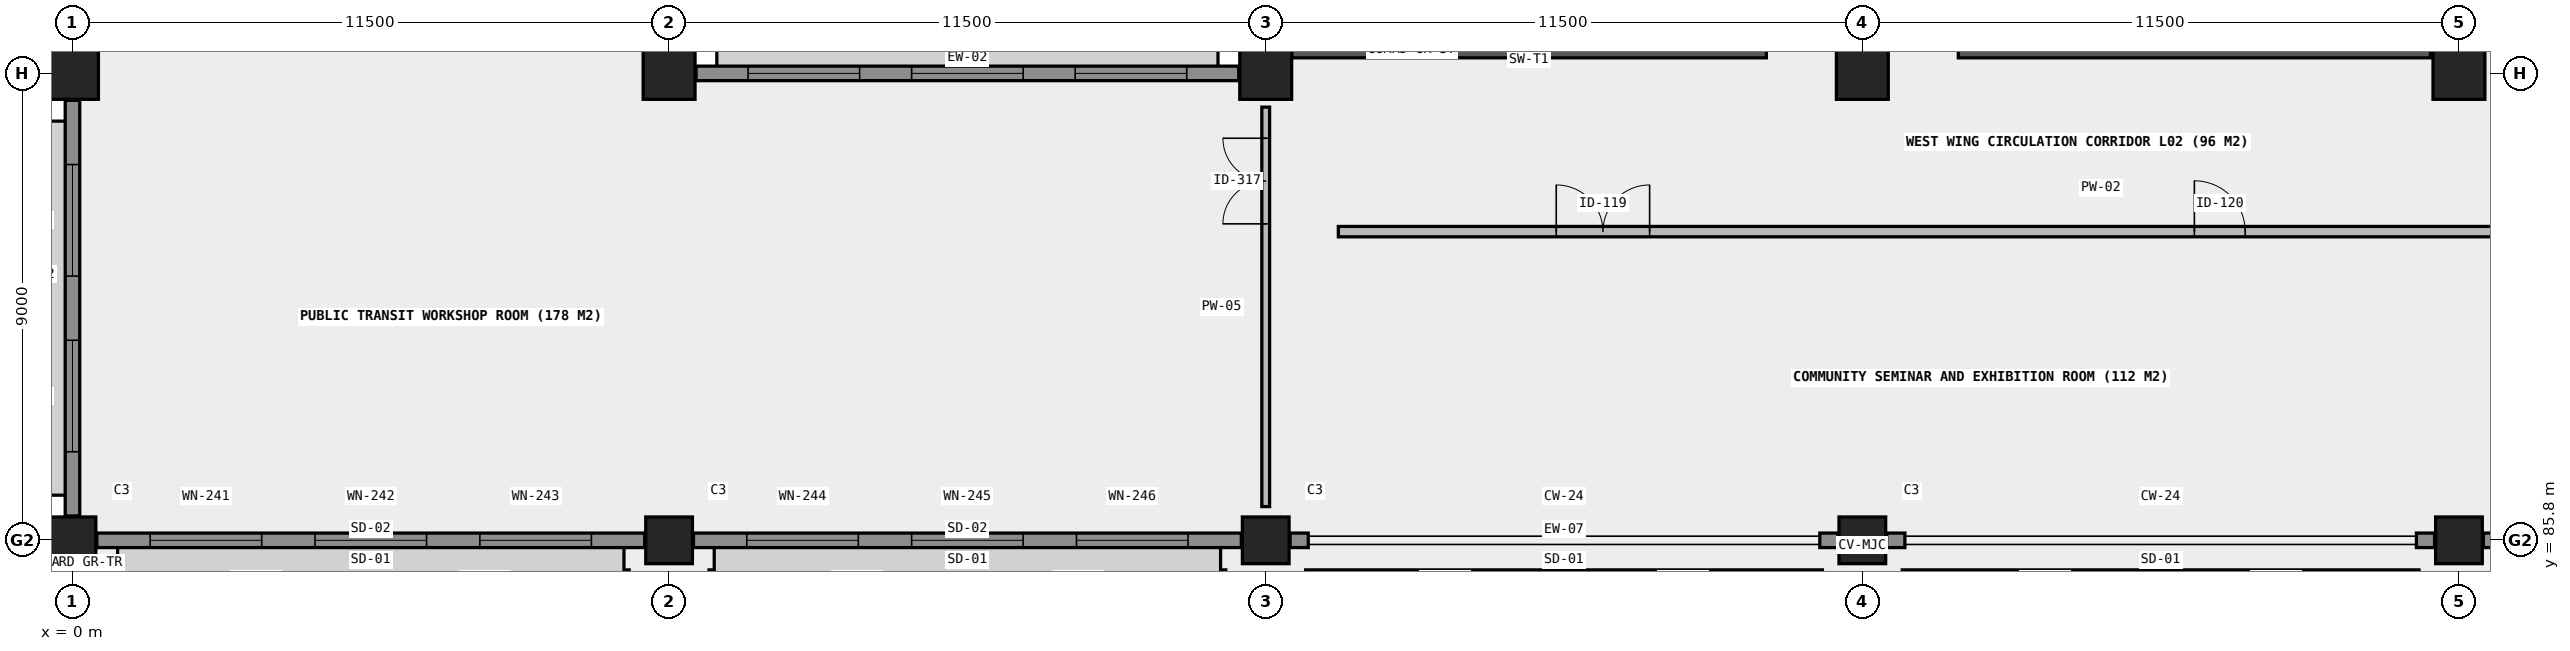
"""IFC4 building model, lengths in metres.
Left out: names, types, materials, properties, quantities, classifications, styles, units other than length and angle.
Written with IfcOpenShell. Run it as: python <this file> out.ifc"""

import sys

from ifc_helpers import new_model, si_unit, direction, frame, frame_2d, origin, origin_2d, place, context, subcontext, project, spatial, rectangle, extrude, element, fill, save


model = new_model("IFC4")
c1 = context("Model", 3, precision=1e-05, world=origin(), true_north=direction((0.0, 1.0)))
c2 = subcontext(c1, "Body", "Model", "MODEL_VIEW")
j1 = project(units=[si_unit("LENGTHUNIT", "METRE"), si_unit("PLANEANGLEUNIT", "RADIAN")], contexts=[c1])
p1 = place(None, origin())
s1 = spatial("IfcSite", under=j1, at=p1, CompositionType="ELEMENT")
p2 = place(p1, origin())
s2 = spatial("IfcBuilding", under=s1, at=p2, CompositionType="ELEMENT")
p3 = place(p2, frame((0.0, 0.0, 8.4)))
s3 = spatial("IfcBuildingStorey", under=s2, at=p3, CompositionType="ELEMENT", Elevation=8.4)
p4 = place(p3, frame((0.0, 85.8, 0.0), z_axis=(0.0, 0.0, 1.0), x_axis=(1.0, 0.0, 0.0)))
e1 = element("IfcColumn", 1, at=p4, inside=s3, PredefinedType="COLUMN", context=c2, shape_type="SweptSolid", body=[
    extrude(rectangle(XDim=0.9, YDim=0.9, at=origin_2d()), origin(), (0.0, 0.0, 1.0), 5.4),
])
p5 = place(p3, frame((0.0, 94.8, 0.0), z_axis=(0.0, 0.0, 1.0), x_axis=(1.0, 0.0, 0.0)))
e2 = element("IfcColumn", 2, at=p5, inside=s3, PredefinedType="COLUMN", context=c2, shape_type="SweptSolid", body=[
    extrude(rectangle(XDim=1.0, YDim=1.0, at=origin_2d()), origin(), (0.0, 0.0, 1.0), 5.4),
])
p6 = place(p3, frame((11.5, 85.8, 0.0), z_axis=(0.0, 0.0, 1.0), x_axis=(1.0, 0.0, 0.0)))
e3 = element("IfcColumn", 3, at=p6, inside=s3, PredefinedType="COLUMN", context=c2, shape_type="SweptSolid", body=[
    extrude(rectangle(XDim=0.9, YDim=0.9, at=origin_2d()), origin(), (0.0, 0.0, 1.0), 5.4),
])
p7 = place(p3, frame((11.5, 94.8, 0.0), z_axis=(0.0, 0.0, 1.0), x_axis=(1.0, 0.0, 0.0)))
e4 = element("IfcColumn", 4, at=p7, inside=s3, PredefinedType="COLUMN", context=c2, shape_type="SweptSolid", body=[
    extrude(rectangle(XDim=1.0, YDim=1.0, at=origin_2d()), origin(), (0.0, 0.0, 1.0), 5.4),
])
p8 = place(p3, frame((23.0, 85.8, 0.0), z_axis=(0.0, 0.0, 1.0), x_axis=(1.0, 0.0, 0.0)))
e5 = element("IfcColumn", 5, at=p8, inside=s3, PredefinedType="COLUMN", context=c2, shape_type="SweptSolid", body=[
    extrude(rectangle(XDim=0.9, YDim=0.9, at=origin_2d()), origin(), (0.0, 0.0, 1.0), 5.4),
])
p9 = place(p3, frame((23.0, 94.8, 0.0), z_axis=(0.0, 0.0, 1.0), x_axis=(1.0, 0.0, 0.0)))
e6 = element("IfcColumn", 6, at=p9, inside=s3, PredefinedType="COLUMN", context=c2, shape_type="SweptSolid", body=[
    extrude(rectangle(XDim=1.0, YDim=1.0, at=origin_2d()), origin(), (0.0, 0.0, 1.0), 5.4),
])
p10 = place(p3, frame((34.5, 85.8, 0.0), z_axis=(0.0, 0.0, 1.0), x_axis=(1.0, 0.0, 0.0)))
e7 = element("IfcColumn", 7, at=p10, inside=s3, PredefinedType="COLUMN", context=c2, shape_type="SweptSolid", body=[
    extrude(rectangle(XDim=0.9, YDim=0.9, at=origin_2d()), origin(), (0.0, 0.0, 1.0), 5.4),
])
p11 = place(p3, frame((34.5, 94.8, 0.0), z_axis=(0.0, 0.0, 1.0), x_axis=(1.0, 0.0, 0.0)))
e8 = element("IfcColumn", 8, at=p11, inside=s3, PredefinedType="COLUMN", context=c2, shape_type="SweptSolid", body=[
    extrude(rectangle(XDim=1.0, YDim=1.0, at=origin_2d()), origin(), (0.0, 0.0, 1.0), 5.4),
])
p12 = place(p3, frame((46.0, 85.8, 0.0), z_axis=(0.0, 0.0, 1.0), x_axis=(1.0, 0.0, 0.0)))
e9 = element("IfcColumn", 9, at=p12, inside=s3, PredefinedType="COLUMN", context=c2, shape_type="SweptSolid", body=[
    extrude(rectangle(XDim=0.9, YDim=0.9, at=origin_2d()), origin(), (0.0, 0.0, 1.0), 5.4),
])
p13 = place(p3, frame((46.0, 94.8, 0.0), z_axis=(0.0, 0.0, 1.0), x_axis=(1.0, 0.0, 0.0)))
e10 = element("IfcColumn", 10, at=p13, inside=s3, PredefinedType="COLUMN", context=c2, shape_type="SweptSolid", body=[
    extrude(rectangle(XDim=1.0, YDim=1.0, at=origin_2d()), origin(), (0.0, 0.0, 1.0), 5.4),
])
p14 = place(p3, frame((23.5, 95.325, 0.0), z_axis=(0.0, 0.0, 1.0), x_axis=(1.0, 0.0, 0.0)))
e11 = element("IfcWall", 11, at=p14, inside=s3, PredefinedType="SHEAR", context=c2, shape_type="SweptSolid", body=[
    extrude(rectangle(XDim=9.15, YDim=0.45, at=frame_2d((4.575, 0.0))), origin(), (0.0, 0.0, 1.0), 5.4),
])
p15 = place(p3, frame((36.35, 95.325, 0.0), z_axis=(0.0, 0.0, 1.0), x_axis=(1.0, 0.0, 0.0)))
e12 = element("IfcWall", 12, at=p15, inside=s3, PredefinedType="SHEAR", context=c2, shape_type="SweptSolid", body=[
    extrude(rectangle(XDim=9.1, YDim=0.45, at=frame_2d((4.55, 0.0))), origin(), (0.0, 0.0, 1.0), 5.4),
])
p16 = place(p3, frame((0.47, 85.8, 0.0), z_axis=(0.0, 0.0, 1.0), x_axis=(1.0, 0.0, 0.0)))
e13 = element("IfcWall", 13, at=p16, inside=s3, PredefinedType="SOLIDWALL", context=c2, shape_type="SweptSolid", body=[
    extrude(rectangle(XDim=10.56, YDim=0.28, at=frame_2d((5.28, 0.0))), origin(), (0.0, 0.0, 1.0), 4.35),
])
p17 = place(p16, frame((1.028, 0.0, 0.85)))
e14 = element("IfcOpeningElement", 14, at=p17, cuts=e13, PredefinedType="OPENING", context=c2, shape_type="SweptSolid", body=[
    extrude(rectangle(XDim=2.15, YDim=1.95, at=frame_2d((1.075, 0.975))), frame((0.0, 0.15, 0.0), z_axis=(0.0, -1.0, 0.0), x_axis=(1.0, 0.0, 0.0)), (0.0, 0.0, 1.0), 0.3),
])
p18 = place(p16, frame((4.205, 0.0, 0.85)))
e15 = element("IfcOpeningElement", 15, at=p18, cuts=e13, PredefinedType="OPENING", context=c2, shape_type="SweptSolid", body=[
    extrude(rectangle(XDim=2.15, YDim=1.95, at=frame_2d((1.075, 0.975))), frame((0.0, 0.15, 0.0), z_axis=(0.0, -1.0, 0.0), x_axis=(1.0, 0.0, 0.0)), (0.0, 0.0, 1.0), 0.3),
])
p19 = place(p16, frame((7.383, 0.0, 0.85)))
e16 = element("IfcOpeningElement", 16, at=p19, cuts=e13, PredefinedType="OPENING", context=c2, shape_type="SweptSolid", body=[
    extrude(rectangle(XDim=2.15, YDim=1.95, at=frame_2d((1.075, 0.975))), frame((0.0, 0.15, 0.0), z_axis=(0.0, -1.0, 0.0), x_axis=(1.0, 0.0, 0.0)), (0.0, 0.0, 1.0), 0.3),
])
p20 = place(p3, frame((11.97, 85.8, 0.0), z_axis=(0.0, 0.0, 1.0), x_axis=(1.0, 0.0, 0.0)))
e17 = element("IfcWall", 17, at=p20, inside=s3, PredefinedType="SOLIDWALL", context=c2, shape_type="SweptSolid", body=[
    extrude(rectangle(XDim=10.56, YDim=0.28, at=frame_2d((5.28, 0.0))), origin(), (0.0, 0.0, 1.0), 4.35),
])
p21 = place(p20, frame((1.028, 0.0, 0.85)))
e18 = element("IfcOpeningElement", 18, at=p21, cuts=e17, PredefinedType="OPENING", context=c2, shape_type="SweptSolid", body=[
    extrude(rectangle(XDim=2.15, YDim=1.95, at=frame_2d((1.075, 0.975))), frame((0.0, 0.15, 0.0), z_axis=(0.0, -1.0, 0.0), x_axis=(1.0, 0.0, 0.0)), (0.0, 0.0, 1.0), 0.3),
])
p22 = place(p20, frame((4.205, 0.0, 0.85)))
e19 = element("IfcOpeningElement", 19, at=p22, cuts=e17, PredefinedType="OPENING", context=c2, shape_type="SweptSolid", body=[
    extrude(rectangle(XDim=2.15, YDim=1.95, at=frame_2d((1.075, 0.975))), frame((0.0, 0.15, 0.0), z_axis=(0.0, -1.0, 0.0), x_axis=(1.0, 0.0, 0.0)), (0.0, 0.0, 1.0), 0.3),
])
p23 = place(p20, frame((7.383, 0.0, 0.85)))
e20 = element("IfcOpeningElement", 20, at=p23, cuts=e17, PredefinedType="OPENING", context=c2, shape_type="SweptSolid", body=[
    extrude(rectangle(XDim=2.15, YDim=1.95, at=frame_2d((1.075, 0.975))), frame((0.0, 0.15, 0.0), z_axis=(0.0, -1.0, 0.0), x_axis=(1.0, 0.0, 0.0)), (0.0, 0.0, 1.0), 0.3),
])
for number, where, z_axis, x_axis in (
    (21, (23.47, 85.8, 0.0), (0.0, 0.0, 1.0), (1.0, 0.0, 0.0)),
    (22, (33.68, 85.8, 0.0), (0.0, 0.0, 1.0), (1.0, 0.0, 0.0)),
    (23, (34.97, 85.8, 0.0), (0.0, 0.0, 1.0), (1.0, 0.0, 0.0)),
    (24, (45.18, 85.8, 0.0), (0.0, 0.0, 1.0), (1.0, 0.0, 0.0)),
):
    element("IfcWall", number, at=place(p3, frame(where, z_axis=z_axis, x_axis=x_axis)), inside=s3, PredefinedType="SOLIDWALL", context=c2, shape_type="SweptSolid", body=[
        extrude(rectangle(XDim=0.35, YDim=0.28, at=frame_2d((0.175, 0.0))), origin(), (0.0, 0.0, 1.0), 5.13),
    ])
p24 = place(p3, frame((46.47, 85.8, 0.0), z_axis=(0.0, 0.0, 1.0), x_axis=(1.0, 0.0, 0.0)))
e25 = element("IfcWall", 25, at=p24, inside=s3, PredefinedType="SOLIDWALL", context=c2, shape_type="SweptSolid", body=[
    extrude(rectangle(XDim=10.56, YDim=0.28, at=frame_2d((5.28, 0.0))), origin(), (0.0, 0.0, 1.0), 4.35),
])
p25 = place(p24, frame((1.028, 0.0, 0.85)))
e26 = element("IfcOpeningElement", 26, at=p25, cuts=e25, PredefinedType="OPENING", context=c2, shape_type="SweptSolid", body=[
    extrude(rectangle(XDim=2.15, YDim=1.95, at=frame_2d((1.075, 0.975))), frame((0.0, 0.15, 0.0), z_axis=(0.0, -1.0, 0.0), x_axis=(1.0, 0.0, 0.0)), (0.0, 0.0, 1.0), 0.3),
])
p26 = place(p24, frame((4.205, 0.0, 0.85)))
e27 = element("IfcOpeningElement", 27, at=p26, cuts=e25, PredefinedType="OPENING", context=c2, shape_type="SweptSolid", body=[
    extrude(rectangle(XDim=2.15, YDim=1.95, at=frame_2d((1.075, 0.975))), frame((0.0, 0.15, 0.0), z_axis=(0.0, -1.0, 0.0), x_axis=(1.0, 0.0, 0.0)), (0.0, 0.0, 1.0), 0.3),
])
p27 = place(p24, frame((7.383, 0.0, 0.85)))
e28 = element("IfcOpeningElement", 28, at=p27, cuts=e25, PredefinedType="OPENING", context=c2, shape_type="SweptSolid", body=[
    extrude(rectangle(XDim=2.15, YDim=1.95, at=frame_2d((1.075, 0.975))), frame((0.0, 0.15, 0.0), z_axis=(0.0, -1.0, 0.0), x_axis=(1.0, 0.0, 0.0)), (0.0, 0.0, 1.0), 0.3),
])
p28 = place(p3, frame((12.02, 94.8, 0.0), z_axis=(0.0, 0.0, 1.0), x_axis=(1.0, 0.0, 0.0)))
e29 = element("IfcWall", 29, at=p28, inside=s3, PredefinedType="SOLIDWALL", context=c2, shape_type="SweptSolid", body=[
    extrude(rectangle(XDim=10.46, YDim=0.28, at=frame_2d((5.23, 0.0))), origin(), (0.0, 0.0, 1.0), 4.35),
])
p29 = place(p28, frame((1.002, 0.0, 0.85)))
e30 = element("IfcOpeningElement", 30, at=p29, cuts=e29, PredefinedType="OPENING", context=c2, shape_type="SweptSolid", body=[
    extrude(rectangle(XDim=2.15, YDim=1.95, at=frame_2d((1.075, 0.975))), frame((0.0, 0.15, 0.0), z_axis=(0.0, -1.0, 0.0), x_axis=(1.0, 0.0, 0.0)), (0.0, 0.0, 1.0), 0.3),
])
p30 = place(p28, frame((4.155, 0.0, 0.85)))
e31 = element("IfcOpeningElement", 31, at=p30, cuts=e29, PredefinedType="OPENING", context=c2, shape_type="SweptSolid", body=[
    extrude(rectangle(XDim=2.15, YDim=1.95, at=frame_2d((1.075, 0.975))), frame((0.0, 0.15, 0.0), z_axis=(0.0, -1.0, 0.0), x_axis=(1.0, 0.0, 0.0)), (0.0, 0.0, 1.0), 0.3),
])
p31 = place(p28, frame((7.308, 0.0, 0.85)))
e32 = element("IfcOpeningElement", 32, at=p31, cuts=e29, PredefinedType="OPENING", context=c2, shape_type="SweptSolid", body=[
    extrude(rectangle(XDim=2.15, YDim=1.95, at=frame_2d((1.075, 0.975))), frame((0.0, 0.15, 0.0), z_axis=(0.0, -1.0, 0.0), x_axis=(1.0, 0.0, 0.0)), (0.0, 0.0, 1.0), 0.3),
])
p32 = place(p3, frame((0.0, 86.27, 0.0), z_axis=(0.0, 0.0, 1.0), x_axis=(0.0, 1.0, 0.0)))
e33 = element("IfcWall", 33, at=p32, inside=s3, PredefinedType="SOLIDWALL", context=c2, shape_type="SweptSolid", body=[
    extrude(rectangle(XDim=8.01, YDim=0.28, at=frame_2d((4.005, 0.0))), origin(), (0.0, 0.0, 1.0), 4.45),
])
p33 = place(p32, frame((1.237, 0.0, 0.85)))
e34 = element("IfcOpeningElement", 34, at=p33, cuts=e33, PredefinedType="OPENING", context=c2, shape_type="SweptSolid", body=[
    extrude(rectangle(XDim=2.15, YDim=1.95, at=frame_2d((1.075, 0.975))), frame((0.0, 0.15, 0.0), z_axis=(0.0, -1.0, 0.0), x_axis=(1.0, 0.0, 0.0)), (0.0, 0.0, 1.0), 0.3),
])
p34 = place(p32, frame((4.623, 0.0, 0.85)))
e35 = element("IfcOpeningElement", 35, at=p34, cuts=e33, PredefinedType="OPENING", context=c2, shape_type="SweptSolid", body=[
    extrude(rectangle(XDim=2.15, YDim=1.95, at=frame_2d((1.075, 0.975))), frame((0.0, 0.15, 0.0), z_axis=(0.0, -1.0, 0.0), x_axis=(1.0, 0.0, 0.0)), (0.0, 0.0, 1.0), 0.3),
])
p35 = place(p3, frame((24.4, 91.75, 0.0), z_axis=(0.0, 0.0, 1.0), x_axis=(1.0, 0.0, 0.0)))
e36 = element("IfcWall", 36, at=p35, inside=s3, PredefinedType="PARTITIONING", context=c2, shape_type="SweptSolid", body=[
    extrude(rectangle(XDim=29.4, YDim=0.2, at=frame_2d((14.7, 0.0))), origin(), (0.0, 0.0, 1.0), 5.12),
])
p36 = place(p35, frame((4.2, 0.0, 0.0)))
e37 = element("IfcOpeningElement", 37, at=p36, cuts=e36, PredefinedType="OPENING", context=c2, shape_type="SweptSolid", body=[
    extrude(rectangle(XDim=1.8, YDim=2.2, at=frame_2d((0.9, 1.1))), frame((0.0, 0.11, 0.0), z_axis=(0.0, -1.0, 0.0), x_axis=(1.0, 0.0, 0.0)), (0.0, 0.0, 1.0), 0.22),
])
p37 = place(p35, frame((16.5, 0.0, 0.0)))
e38 = element("IfcOpeningElement", 38, at=p37, cuts=e36, PredefinedType="OPENING", context=c2, shape_type="SweptSolid", body=[
    extrude(rectangle(XDim=0.98, YDim=2.15, at=frame_2d((0.49, 1.075))), frame((0.0, 0.11, 0.0), z_axis=(0.0, -1.0, 0.0), x_axis=(1.0, 0.0, 0.0)), (0.0, 0.0, 1.0), 0.22),
])
p38 = place(p3, frame((23.0, 86.45, 0.0), z_axis=(0.0, 0.0, 1.0), x_axis=(0.0, 1.0, 0.0)))
e39 = element("IfcWall", 39, at=p38, inside=s3, PredefinedType="PARTITIONING", context=c2, shape_type="SweptSolid", body=[
    extrude(rectangle(XDim=7.7, YDim=0.15, at=frame_2d((3.85, 0.0))), origin(), (0.0, 0.0, 1.0), 4.35),
])
p39 = place(p38, frame((5.45, 0.0, 0.0)))
e40 = element("IfcOpeningElement", 40, at=p39, cuts=e39, PredefinedType="OPENING", context=c2, shape_type="SweptSolid", body=[
    extrude(rectangle(XDim=1.65, YDim=2.2, at=frame_2d((0.825, 1.1))), frame((0.0, 0.085, 0.0), z_axis=(0.0, -1.0, 0.0), x_axis=(1.0, 0.0, 0.0)), (0.0, 0.0, 1.0), 0.17),
])
p40 = place(p17, origin())
e41 = element("IfcWindow", 41, at=p40, inside=s3, PartitioningType="SINGLE_PANEL", PredefinedType="WINDOW", context=c2, shape_type="SweptSolid", body=[
    extrude(rectangle(XDim=2.15, YDim=1.95, at=frame_2d((1.075, 0.975))), frame((0.0, 0.03, 0.0), z_axis=(0.0, -1.0, 0.0), x_axis=(1.0, 0.0, 0.0)), (0.0, 0.0, 1.0), 0.06),
])
fill(e14, e41)
p41 = place(p18, origin())
e42 = element("IfcWindow", 42, at=p41, inside=s3, PartitioningType="SINGLE_PANEL", PredefinedType="WINDOW", context=c2, shape_type="SweptSolid", body=[
    extrude(rectangle(XDim=2.15, YDim=1.95, at=frame_2d((1.075, 0.975))), frame((0.0, 0.03, 0.0), z_axis=(0.0, -1.0, 0.0), x_axis=(1.0, 0.0, 0.0)), (0.0, 0.0, 1.0), 0.06),
])
fill(e15, e42)
p42 = place(p19, origin())
e43 = element("IfcWindow", 43, at=p42, inside=s3, PartitioningType="SINGLE_PANEL", PredefinedType="WINDOW", context=c2, shape_type="SweptSolid", body=[
    extrude(rectangle(XDim=2.15, YDim=1.95, at=frame_2d((1.075, 0.975))), frame((0.0, 0.03, 0.0), z_axis=(0.0, -1.0, 0.0), x_axis=(1.0, 0.0, 0.0)), (0.0, 0.0, 1.0), 0.06),
])
fill(e16, e43)
p43 = place(p21, origin())
e44 = element("IfcWindow", 44, at=p43, inside=s3, PartitioningType="SINGLE_PANEL", PredefinedType="WINDOW", context=c2, shape_type="SweptSolid", body=[
    extrude(rectangle(XDim=2.15, YDim=1.95, at=frame_2d((1.075, 0.975))), frame((0.0, 0.03, 0.0), z_axis=(0.0, -1.0, 0.0), x_axis=(1.0, 0.0, 0.0)), (0.0, 0.0, 1.0), 0.06),
])
fill(e18, e44)
p44 = place(p22, origin())
e45 = element("IfcWindow", 45, at=p44, inside=s3, PartitioningType="SINGLE_PANEL", PredefinedType="WINDOW", context=c2, shape_type="SweptSolid", body=[
    extrude(rectangle(XDim=2.15, YDim=1.95, at=frame_2d((1.075, 0.975))), frame((0.0, 0.03, 0.0), z_axis=(0.0, -1.0, 0.0), x_axis=(1.0, 0.0, 0.0)), (0.0, 0.0, 1.0), 0.06),
])
fill(e19, e45)
p45 = place(p23, origin())
e46 = element("IfcWindow", 46, at=p45, inside=s3, PartitioningType="SINGLE_PANEL", PredefinedType="WINDOW", context=c2, shape_type="SweptSolid", body=[
    extrude(rectangle(XDim=2.15, YDim=1.95, at=frame_2d((1.075, 0.975))), frame((0.0, 0.03, 0.0), z_axis=(0.0, -1.0, 0.0), x_axis=(1.0, 0.0, 0.0)), (0.0, 0.0, 1.0), 0.06),
])
fill(e20, e46)
p46 = place(p29, origin())
e47 = element("IfcWindow", 47, at=p46, inside=s3, PartitioningType="SINGLE_PANEL", PredefinedType="WINDOW", context=c2, shape_type="SweptSolid", body=[
    extrude(rectangle(XDim=2.15, YDim=1.95, at=frame_2d((1.075, 0.975))), frame((0.0, 0.03, 0.0), z_axis=(0.0, -1.0, 0.0), x_axis=(1.0, 0.0, 0.0)), (0.0, 0.0, 1.0), 0.06),
])
fill(e30, e47)
p47 = place(p30, origin())
e48 = element("IfcWindow", 48, at=p47, inside=s3, PartitioningType="SINGLE_PANEL", PredefinedType="WINDOW", context=c2, shape_type="SweptSolid", body=[
    extrude(rectangle(XDim=2.15, YDim=1.95, at=frame_2d((1.075, 0.975))), frame((0.0, 0.03, 0.0), z_axis=(0.0, -1.0, 0.0), x_axis=(1.0, 0.0, 0.0)), (0.0, 0.0, 1.0), 0.06),
])
fill(e31, e48)
p48 = place(p31, origin())
e49 = element("IfcWindow", 49, at=p48, inside=s3, PartitioningType="SINGLE_PANEL", PredefinedType="WINDOW", context=c2, shape_type="SweptSolid", body=[
    extrude(rectangle(XDim=2.15, YDim=1.95, at=frame_2d((1.075, 0.975))), frame((0.0, 0.03, 0.0), z_axis=(0.0, -1.0, 0.0), x_axis=(1.0, 0.0, 0.0)), (0.0, 0.0, 1.0), 0.06),
])
fill(e32, e49)
p49 = place(p33, origin())
e50 = element("IfcWindow", 50, at=p49, inside=s3, PartitioningType="SINGLE_PANEL", PredefinedType="WINDOW", context=c2, shape_type="SweptSolid", body=[
    extrude(rectangle(XDim=2.15, YDim=1.95, at=frame_2d((1.075, 0.975))), frame((0.0, 0.03, 0.0), z_axis=(0.0, -1.0, 0.0), x_axis=(1.0, 0.0, 0.0)), (0.0, 0.0, 1.0), 0.06),
])
fill(e34, e50)
p50 = place(p34, origin())
e51 = element("IfcWindow", 51, at=p50, inside=s3, PartitioningType="SINGLE_PANEL", PredefinedType="WINDOW", context=c2, shape_type="SweptSolid", body=[
    extrude(rectangle(XDim=2.15, YDim=1.95, at=frame_2d((1.075, 0.975))), frame((0.0, 0.03, 0.0), z_axis=(0.0, -1.0, 0.0), x_axis=(1.0, 0.0, 0.0)), (0.0, 0.0, 1.0), 0.06),
])
fill(e35, e51)
p51 = place(p36, origin())
e52 = element("IfcDoor", 52, at=p51, inside=s3, OperationType="DOUBLE_DOOR_SINGLE_SWING", PredefinedType="DOOR", context=c2, shape_type="SweptSolid", body=[
    extrude(rectangle(XDim=1.8, YDim=2.2, at=frame_2d((0.9, 1.1))), frame((0.0, 0.025, 0.0), z_axis=(0.0, -1.0, 0.0), x_axis=(1.0, 0.0, 0.0)), (0.0, 0.0, 1.0), 0.05),
])
fill(e37, e52)
p52 = place(p37, origin())
e53 = element("IfcDoor", 53, at=p52, inside=s3, OperationType="SINGLE_SWING_LEFT", PredefinedType="DOOR", context=c2, shape_type="SweptSolid", body=[
    extrude(rectangle(XDim=0.98, YDim=2.15, at=frame_2d((0.49, 1.075))), frame((0.0, 0.025, 0.0), z_axis=(0.0, -1.0, 0.0), x_axis=(1.0, 0.0, 0.0)), (0.0, 0.0, 1.0), 0.05),
])
fill(e38, e53)
p53 = place(p39, origin())
e54 = element("IfcDoor", 54, at=p53, inside=s3, OperationType="DOUBLE_DOOR_SINGLE_SWING", PredefinedType="DOOR", context=c2, shape_type="SweptSolid", body=[
    extrude(rectangle(XDim=1.65, YDim=2.2, at=frame_2d((0.825, 1.1))), frame((0.0, 0.025, 0.0), z_axis=(0.0, -1.0, 0.0), x_axis=(1.0, 0.0, 0.0)), (0.0, 0.0, 1.0), 0.05),
])
fill(e40, e54)
save(model, sys.argv[1])
